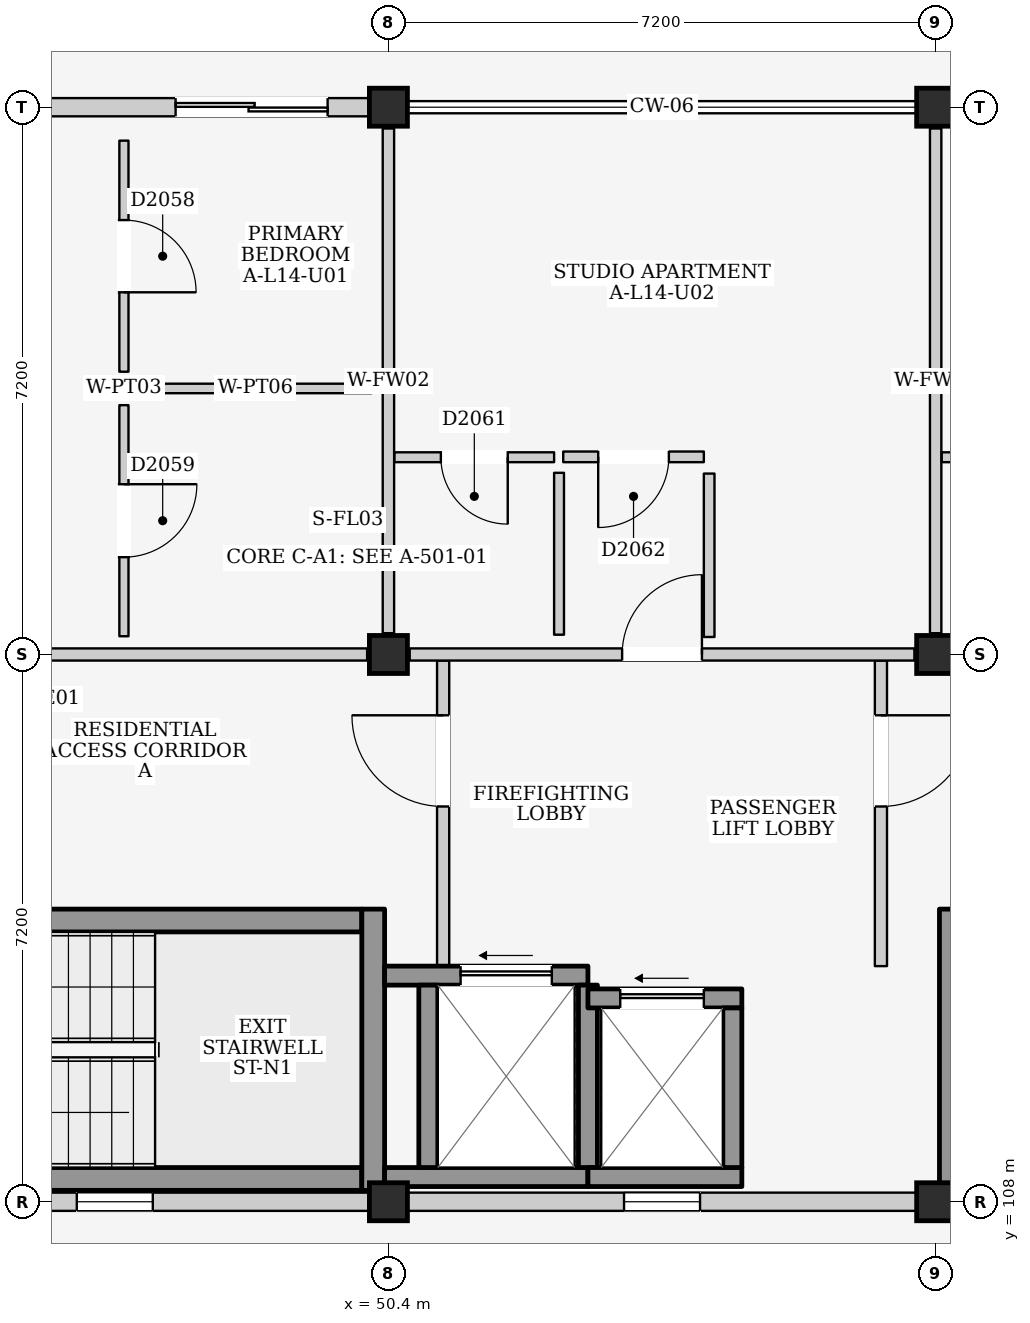
"""IFC4 building model, lengths in metres.
Left out: names, types, materials, properties, quantities, classifications, styles, units other than length and angle.
Written with IfcOpenShell. Run it as: python <this file> out.ifc"""

import sys

from ifc_helpers import new_model, si_unit, direction, frame, frame_2d, origin, origin_2d, place, context, subcontext, project, spatial, rectangle, extrude, element, fill, save


model = new_model("IFC4")
c1 = context("Model", 3, precision=1e-05, world=origin(), true_north=direction((0.0, 1.0)))
c2 = subcontext(c1, "Body", "Model", "MODEL_VIEW")
j1 = project(units=[si_unit("LENGTHUNIT", "METRE"), si_unit("PLANEANGLEUNIT", "RADIAN")], contexts=[c1])
p1 = place(None, origin())
s1 = spatial("IfcSite", under=j1, at=p1, CompositionType="ELEMENT")
p2 = place(p1, origin())
s2 = spatial("IfcBuilding", under=s1, at=p2, CompositionType="ELEMENT")
p3 = place(p2, frame((0.0, 0.0, 47.7)))
s3 = spatial("IfcBuildingStorey", under=s2, at=p3, CompositionType="ELEMENT", Elevation=47.7)
for number, where, z_axis, x_axis in (
    (1, (50.4, 108.0, 0.0), (0.0, 0.0, 1.0), (1.0, 0.0, 0.0)),
    (2, (50.4, 115.2, 0.0), (0.0, 0.0, 1.0), (1.0, 0.0, 0.0)),
    (3, (50.4, 122.4, 0.0), (0.0, 0.0, 1.0), (1.0, 0.0, 0.0)),
    (4, (57.6, 108.0, 0.0), (0.0, 0.0, 1.0), (1.0, 0.0, 0.0)),
    (5, (57.6, 115.2, 0.0), (0.0, 0.0, 1.0), (1.0, 0.0, 0.0)),
    (6, (57.6, 122.4, 0.0), (0.0, 0.0, 1.0), (1.0, 0.0, 0.0)),
):
    element("IfcColumn", number, at=place(p3, frame(where, z_axis=z_axis, x_axis=x_axis)), inside=s3, PredefinedType="COLUMN", context=c2, shape_type="SweptSolid", body=[
        extrude(rectangle(XDim=0.5, YDim=0.5, at=origin_2d()), origin(), (0.0, 0.0, 1.0), 3.2),
    ])
p4 = place(p3, frame((43.45, 122.4, 0.0), z_axis=(0.0, 0.0, 1.0), x_axis=(1.0, 0.0, 0.0)))
e7 = element("IfcWall", 7, at=p4, inside=s3, PredefinedType="ELEMENTEDWALL", context=c2, shape_type="SweptSolid", body=[
    extrude(rectangle(XDim=6.7, YDim=0.24, at=frame_2d((3.35, 0.0))), origin(), (0.0, 0.0, 1.0), 2.535),
])
p5 = place(p4, frame((4.15, 0.0, 0.0)))
e8 = element("IfcOpeningElement", 8, at=p5, cuts=e7, PredefinedType="OPENING", context=c2, shape_type="SweptSolid", body=[
    extrude(rectangle(XDim=2.0, YDim=2.12, at=frame_2d((1.0, 1.06))), frame((0.0, 0.135, 0.0), z_axis=(0.0, -1.0, 0.0), x_axis=(1.0, 0.0, 0.0)), (0.0, 0.0, 1.0), 0.27),
])
p6 = place(p4, frame((0.45, 0.0, 0.9)))
e9 = element("IfcOpeningElement", 9, at=p6, cuts=e7, PredefinedType="OPENING", context=c2, shape_type="SweptSolid", body=[
    extrude(rectangle(XDim=1.85, YDim=1.4, at=frame_2d((0.925, 0.7))), frame((0.0, 0.135, 0.0), z_axis=(0.0, -1.0, 0.0), x_axis=(1.0, 0.0, 0.0)), (0.0, 0.0, 1.0), 0.27),
])
p7 = place(p3, frame((43.45, 108.0, 0.0), z_axis=(0.0, 0.0, 1.0), x_axis=(1.0, 0.0, 0.0)))
e10 = element("IfcWall", 10, at=p7, inside=s3, PredefinedType="ELEMENTEDWALL", context=c2, shape_type="SweptSolid", body=[
    extrude(rectangle(XDim=6.7, YDim=0.24, at=frame_2d((3.35, 0.0))), origin(), (0.0, 0.0, 1.0), 2.335),
])
p8 = place(p7, frame((2.85, 0.0, 1.2)))
e11 = element("IfcOpeningElement", 11, at=p8, cuts=e10, PredefinedType="OPENING", context=c2, shape_type="SweptSolid", body=[
    extrude(rectangle(XDim=1.0, YDim=0.9, at=frame_2d((0.5, 0.45))), frame((0.0, 0.135, 0.0), z_axis=(0.0, -1.0, 0.0), x_axis=(1.0, 0.0, 0.0)), (0.0, 0.0, 1.0), 0.27),
])
p9 = place(p3, frame((50.65, 108.0, 0.0), z_axis=(0.0, 0.0, 1.0), x_axis=(1.0, 0.0, 0.0)))
e12 = element("IfcWall", 12, at=p9, inside=s3, PredefinedType="ELEMENTEDWALL", context=c2, shape_type="SweptSolid", body=[
    extrude(rectangle(XDim=6.7, YDim=0.24, at=frame_2d((3.35, 0.0))), origin(), (0.0, 0.0, 1.0), 2.335),
])
p10 = place(p9, frame((2.85, 0.0, 1.2)))
e13 = element("IfcOpeningElement", 13, at=p10, cuts=e12, PredefinedType="OPENING", context=c2, shape_type="SweptSolid", body=[
    extrude(rectangle(XDim=1.0, YDim=0.9, at=frame_2d((0.5, 0.45))), frame((0.0, 0.135, 0.0), z_axis=(0.0, -1.0, 0.0), x_axis=(1.0, 0.0, 0.0)), (0.0, 0.0, 1.0), 0.27),
])
p11 = place(p3, frame((43.55, 108.3, 0.0), z_axis=(0.0, 0.0, 1.0), x_axis=(1.0, 0.0, 0.0)))
e14 = element("IfcWall", 14, at=p11, inside=s3, PredefinedType="SHEAR", context=c2, shape_type="SweptSolid", body=[
    extrude(rectangle(XDim=6.5, YDim=0.3, at=frame_2d((3.25, 0.0))), origin(), (0.0, 0.0, 1.0), 3.0),
])
p12 = place(p3, frame((43.55, 111.7, 0.0), z_axis=(0.0, 0.0, 1.0), x_axis=(1.0, 0.0, 0.0)))
e15 = element("IfcWall", 15, at=p12, inside=s3, PredefinedType="SHEAR", context=c2, shape_type="SweptSolid", body=[
    extrude(rectangle(XDim=6.5, YDim=0.3, at=frame_2d((3.25, 0.0))), origin(), (0.0, 0.0, 1.0), 3.0),
])
p13 = place(p12, frame((0.18, 0.0, 0.0)))
e16 = element("IfcOpeningElement", 16, at=p13, cuts=e15, PredefinedType="OPENING", context=c2, shape_type="SweptSolid", body=[
    extrude(rectangle(XDim=1.15, YDim=2.2, at=frame_2d((0.575, 1.1))), frame((0.0, 0.165, 0.0), z_axis=(0.0, -1.0, 0.0), x_axis=(1.0, 0.0, 0.0)), (0.0, 0.0, 1.0), 0.33),
])
p14 = place(p3, frame((50.2, 108.15, 0.0), z_axis=(0.0, 0.0, 1.0), x_axis=(0.0, 1.0, 0.0)))
e17 = element("IfcWall", 17, at=p14, inside=s3, PredefinedType="SHEAR", context=c2, shape_type="SweptSolid", body=[
    extrude(rectangle(XDim=3.7, YDim=0.3, at=frame_2d((1.85, 0.0))), origin(), (0.0, 0.0, 1.0), 3.0),
])
p15 = place(p3, frame((51.12, 111.1, 0.0), z_axis=(0.0, 0.0, 1.0), x_axis=(0.0, 1.0, 0.0)))
e18 = element("IfcWall", 18, at=p15, inside=s3, PredefinedType="PARTITIONING", context=c2, shape_type="SweptSolid", body=[
    extrude(rectangle(XDim=4.02, YDim=0.16, at=frame_2d((2.01, 0.0))), origin(), (0.0, 0.0, 1.0), 3.0),
])
p16 = place(p15, frame((2.1, 0.0, 0.0)))
e19 = element("IfcOpeningElement", 19, at=p16, cuts=e18, PredefinedType="OPENING", context=c2, shape_type="SweptSolid", body=[
    extrude(rectangle(XDim=1.2, YDim=2.2, at=frame_2d((0.6, 1.1))), frame((0.0, 0.095, 0.0), z_axis=(0.0, -1.0, 0.0), x_axis=(1.0, 0.0, 0.0)), (0.0, 0.0, 1.0), 0.19),
])
p17 = place(p3, frame((56.88, 111.1, 0.0), z_axis=(0.0, 0.0, 1.0), x_axis=(0.0, 1.0, 0.0)))
e20 = element("IfcWall", 20, at=p17, inside=s3, PredefinedType="PARTITIONING", context=c2, shape_type="SweptSolid", body=[
    extrude(rectangle(XDim=4.02, YDim=0.16, at=frame_2d((2.01, 0.0))), origin(), (0.0, 0.0, 1.0), 3.0),
])
p18 = place(p17, frame((2.1, 0.0, 0.0)))
e21 = element("IfcOpeningElement", 21, at=p18, cuts=e20, PredefinedType="OPENING", context=c2, shape_type="SweptSolid", body=[
    extrude(rectangle(XDim=1.2, YDim=2.2, at=frame_2d((0.6, 1.1))), frame((0.0, 0.095, 0.0), z_axis=(0.0, -1.0, 0.0), x_axis=(1.0, 0.0, 0.0)), (0.0, 0.0, 1.0), 0.19),
])
p19 = place(p3, frame((50.35, 108.325, 0.0), z_axis=(0.0, 0.0, 1.0), x_axis=(1.0, 0.0, 0.0)))
e22 = element("IfcWall", 22, at=p19, inside=s3, PredefinedType="SHEAR", context=c2, shape_type="SweptSolid", body=[
    extrude(rectangle(XDim=2.675, YDim=0.25, at=frame_2d((1.337, 0.0))), origin(), (0.0, 0.0, 1.0), 3.0),
])
p20 = place(p3, frame((50.35, 110.975, 0.0), z_axis=(0.0, 0.0, 1.0), x_axis=(1.0, 0.0, 0.0)))
e23 = element("IfcWall", 23, at=p20, inside=s3, PredefinedType="SHEAR", context=c2, shape_type="SweptSolid", body=[
    extrude(rectangle(XDim=2.675, YDim=0.25, at=frame_2d((1.337, 0.0))), origin(), (0.0, 0.0, 1.0), 3.0),
])
p21 = place(p20, frame((1.0, 0.0, 0.0)))
e24 = element("IfcOpeningElement", 24, at=p21, cuts=e23, PredefinedType="OPENING", context=c2, shape_type="SweptSolid", body=[
    extrude(rectangle(XDim=1.2, YDim=2.25, at=frame_2d((0.6, 1.125))), frame((0.0, 0.14, 0.0), z_axis=(0.0, -1.0, 0.0), x_axis=(1.0, 0.0, 0.0)), (0.0, 0.0, 1.0), 0.28),
])
for number, where, z_axis, x_axis in (
    (25, (50.925, 108.45, 0.0), (0.0, 0.0, 1.0), (0.0, 1.0, 0.0)),
    (26, (53.025, 108.45, 0.0), (0.0, 0.0, 1.0), (0.0, 1.0, 0.0)),
):
    element("IfcWall", number, at=place(p3, frame(where, z_axis=z_axis, x_axis=x_axis)), inside=s3, PredefinedType="SHEAR", context=c2, shape_type="SweptSolid", body=[
        extrude(rectangle(XDim=2.4, YDim=0.25, at=frame_2d((1.2, 0.0))), origin(), (0.0, 0.0, 1.0), 3.0),
    ])
p22 = place(p3, frame((53.025, 108.325, 0.0), z_axis=(0.0, 0.0, 1.0), x_axis=(1.0, 0.0, 0.0)))
e27 = element("IfcWall", 27, at=p22, inside=s3, PredefinedType="SHEAR", context=c2, shape_type="SweptSolid", body=[
    extrude(rectangle(XDim=2.025, YDim=0.25, at=frame_2d((1.013, 0.0))), origin(), (0.0, 0.0, 1.0), 3.0),
])
p23 = place(p3, frame((53.025, 110.675, 0.0), z_axis=(0.0, 0.0, 1.0), x_axis=(1.0, 0.0, 0.0)))
e28 = element("IfcWall", 28, at=p23, inside=s3, PredefinedType="SHEAR", context=c2, shape_type="SweptSolid", body=[
    extrude(rectangle(XDim=2.025, YDim=0.25, at=frame_2d((1.013, 0.0))), origin(), (0.0, 0.0, 1.0), 3.0),
])
p24 = place(p23, frame((0.425, 0.0, 0.0)))
e29 = element("IfcOpeningElement", 29, at=p24, cuts=e28, PredefinedType="OPENING", context=c2, shape_type="SweptSolid", body=[
    extrude(rectangle(XDim=1.1, YDim=2.15, at=frame_2d((0.55, 1.075))), frame((0.0, 0.14, 0.0), z_axis=(0.0, -1.0, 0.0), x_axis=(1.0, 0.0, 0.0)), (0.0, 0.0, 1.0), 0.28),
])
p25 = place(p3, frame((54.925, 108.45, 0.0), z_axis=(0.0, 0.0, 1.0), x_axis=(0.0, 1.0, 0.0)))
e30 = element("IfcWall", 30, at=p25, inside=s3, PredefinedType="SHEAR", context=c2, shape_type="SweptSolid", body=[
    extrude(rectangle(XDim=2.1, YDim=0.25, at=frame_2d((1.05, 0.0))), origin(), (0.0, 0.0, 1.0), 3.0),
])
p26 = place(p3, frame((57.8, 108.15, 0.0), z_axis=(0.0, 0.0, 1.0), x_axis=(0.0, 1.0, 0.0)))
e31 = element("IfcWall", 31, at=p26, inside=s3, PredefinedType="SHEAR", context=c2, shape_type="SweptSolid", body=[
    extrude(rectangle(XDim=3.7, YDim=0.3, at=frame_2d((1.85, 0.0))), origin(), (0.0, 0.0, 1.0), 3.0),
])
p27 = place(p3, frame((43.48, 115.2, 0.0), z_axis=(0.0, 0.0, 1.0), x_axis=(1.0, 0.0, 0.0)))
e32 = element("IfcWall", 32, at=p27, inside=s3, PredefinedType="PARTITIONING", context=c2, shape_type="SweptSolid", body=[
    extrude(rectangle(XDim=6.64, YDim=0.16, at=frame_2d((3.32, 0.0))), origin(), (0.0, 0.0, 1.0), 2.335),
])
p28 = place(p27, frame((0.18, 0.0, 0.0)))
e33 = element("IfcOpeningElement", 33, at=p28, cuts=e32, PredefinedType="OPENING", context=c2, shape_type="SweptSolid", body=[
    extrude(rectangle(XDim=1.05, YDim=2.15, at=frame_2d((0.525, 1.075))), frame((0.0, 0.095, 0.0), z_axis=(0.0, -1.0, 0.0), x_axis=(1.0, 0.0, 0.0)), (0.0, 0.0, 1.0), 0.19),
])
p29 = place(p3, frame((50.4, 115.48, 0.0), z_axis=(0.0, 0.0, 1.0), x_axis=(0.0, 1.0, 0.0)))
e34 = element("IfcWall", 34, at=p29, inside=s3, PredefinedType="PARTITIONING", context=c2, shape_type="SweptSolid", body=[
    extrude(rectangle(XDim=6.64, YDim=0.15, at=frame_2d((3.32, 0.0))), origin(), (0.0, 0.0, 1.0), 2.485),
])
p30 = place(p3, frame((46.92, 118.92, 0.0), z_axis=(0.0, 0.0, 1.0), x_axis=(0.0, 1.0, 0.0)))
e35 = element("IfcWall", 35, at=p30, inside=s3, PredefinedType="PARTITIONING", context=c2, shape_type="SweptSolid", body=[
    extrude(rectangle(XDim=3.04, YDim=0.12, at=frame_2d((1.52, 0.0))), origin(), (0.0, 0.0, 1.0), 3.0),
])
p31 = place(p30, frame((1.045, 0.0, 0.0)))
e36 = element("IfcOpeningElement", 36, at=p31, cuts=e35, PredefinedType="OPENING", context=c2, shape_type="SweptSolid", body=[
    extrude(rectangle(XDim=0.95, YDim=2.15, at=frame_2d((0.475, 1.075))), frame((0.0, 0.075, 0.0), z_axis=(0.0, -1.0, 0.0), x_axis=(1.0, 0.0, 0.0)), (0.0, 0.0, 1.0), 0.15),
])
p32 = place(p3, frame((47.12, 118.7, 0.0), z_axis=(0.0, 0.0, 1.0), x_axis=(1.0, 0.0, 0.0)))
e37 = element("IfcWall", 37, at=p32, inside=s3, PredefinedType="PARTITIONING", context=c2, shape_type="SweptSolid", body=[
    extrude(rectangle(XDim=3.06, YDim=0.125, at=frame_2d((1.53, 0.0))), origin(), (0.0, 0.0, 1.0), 3.0),
])
p33 = place(p3, frame((46.92, 115.44, 0.0), z_axis=(0.0, 0.0, 1.0), x_axis=(0.0, 1.0, 0.0)))
e38 = element("IfcWall", 38, at=p33, inside=s3, PredefinedType="PARTITIONING", context=c2, shape_type="SweptSolid", body=[
    extrude(rectangle(XDim=3.04, YDim=0.12, at=frame_2d((1.52, 0.0))), origin(), (0.0, 0.0, 1.0), 3.0),
])
p34 = place(p33, frame((1.04, 0.0, 0.0)))
e39 = element("IfcOpeningElement", 39, at=p34, cuts=e38, PredefinedType="OPENING", context=c2, shape_type="SweptSolid", body=[
    extrude(rectangle(XDim=0.96, YDim=2.15, at=frame_2d((0.48, 1.075))), frame((0.0, 0.075, 0.0), z_axis=(0.0, -1.0, 0.0), x_axis=(1.0, 0.0, 0.0)), (0.0, 0.0, 1.0), 0.15),
])
p35 = place(p3, frame((50.68, 115.2, 0.0), z_axis=(0.0, 0.0, 1.0), x_axis=(1.0, 0.0, 0.0)))
e40 = element("IfcWall", 40, at=p35, inside=s3, PredefinedType="PARTITIONING", context=c2, shape_type="SweptSolid", body=[
    extrude(rectangle(XDim=6.64, YDim=0.16, at=frame_2d((3.32, 0.0))), origin(), (0.0, 0.0, 1.0), 2.335),
])
p36 = place(p35, frame((2.795, 0.0, 0.0)))
e41 = element("IfcOpeningElement", 41, at=p36, cuts=e40, PredefinedType="OPENING", context=c2, shape_type="SweptSolid", body=[
    extrude(rectangle(XDim=1.05, YDim=2.15, at=frame_2d((0.525, 1.075))), frame((0.0, 0.095, 0.0), z_axis=(0.0, -1.0, 0.0), x_axis=(1.0, 0.0, 0.0)), (0.0, 0.0, 1.0), 0.19),
])
p37 = place(p3, frame((57.6, 115.48, 0.0), z_axis=(0.0, 0.0, 1.0), x_axis=(0.0, 1.0, 0.0)))
e42 = element("IfcWall", 42, at=p37, inside=s3, PredefinedType="PARTITIONING", context=c2, shape_type="SweptSolid", body=[
    extrude(rectangle(XDim=6.64, YDim=0.15, at=frame_2d((3.32, 0.0))), origin(), (0.0, 0.0, 1.0), 2.485),
])
p38 = place(p3, frame((50.48, 117.795, 0.0), z_axis=(0.0, 0.0, 1.0), x_axis=(1.0, 0.0, 0.0)))
e43 = element("IfcWall", 43, at=p38, inside=s3, PredefinedType="PARTITIONING", context=c2, shape_type="SweptSolid", body=[
    extrude(rectangle(XDim=2.1, YDim=0.13, at=frame_2d((1.05, 0.0))), origin(), (0.0, 0.0, 1.0), 3.0),
])
p39 = place(p38, frame((0.61, 0.0, 0.0)))
e44 = element("IfcOpeningElement", 44, at=p39, cuts=e43, PredefinedType="OPENING", context=c2, shape_type="SweptSolid", body=[
    extrude(rectangle(XDim=0.88, YDim=2.1, at=frame_2d((0.44, 1.05))), frame((0.0, 0.08, 0.0), z_axis=(0.0, -1.0, 0.0), x_axis=(1.0, 0.0, 0.0)), (0.0, 0.0, 1.0), 0.16),
])
p40 = place(p3, frame((52.645, 115.46, 0.0), z_axis=(0.0, 0.0, 1.0), x_axis=(0.0, 1.0, 0.0)))
e45 = element("IfcWall", 45, at=p40, inside=s3, PredefinedType="PARTITIONING", context=c2, shape_type="SweptSolid", body=[
    extrude(rectangle(XDim=2.13, YDim=0.13, at=frame_2d((1.065, 0.0))), origin(), (0.0, 0.0, 1.0), 3.0),
])
p41 = place(p3, frame((52.7, 117.8, 0.0), z_axis=(0.0, 0.0, 1.0), x_axis=(1.0, 0.0, 0.0)))
e46 = element("IfcWall", 46, at=p41, inside=s3, PredefinedType="PARTITIONING", context=c2, shape_type="SweptSolid", body=[
    extrude(rectangle(XDim=1.85, YDim=0.14, at=frame_2d((0.925, 0.0))), origin(), (0.0, 0.0, 1.0), 3.0),
])
p42 = place(p41, frame((0.46, 0.0, 0.0)))
e47 = element("IfcOpeningElement", 47, at=p42, cuts=e46, PredefinedType="OPENING", context=c2, shape_type="SweptSolid", body=[
    extrude(rectangle(XDim=0.93, YDim=2.14, at=frame_2d((0.465, 1.07))), frame((0.0, 0.085, 0.0), z_axis=(0.0, -1.0, 0.0), x_axis=(1.0, 0.0, 0.0)), (0.0, 0.0, 1.0), 0.17),
])
p43 = place(p3, frame((54.62, 115.43, 0.0), z_axis=(0.0, 0.0, 1.0), x_axis=(0.0, 1.0, 0.0)))
e48 = element("IfcWall", 48, at=p43, inside=s3, PredefinedType="PARTITIONING", context=c2, shape_type="SweptSolid", body=[
    extrude(rectangle(XDim=2.15, YDim=0.14, at=frame_2d((1.075, 0.0))), origin(), (0.0, 0.0, 1.0), 3.0),
])
p44 = place(p3, frame((57.68, 117.795, 0.0), z_axis=(0.0, 0.0, 1.0), x_axis=(1.0, 0.0, 0.0)))
e49 = element("IfcWall", 49, at=p44, inside=s3, PredefinedType="PARTITIONING", context=c2, shape_type="SweptSolid", body=[
    extrude(rectangle(XDim=2.1, YDim=0.13, at=frame_2d((1.05, 0.0))), origin(), (0.0, 0.0, 1.0), 3.0),
])
p45 = place(p44, frame((0.61, 0.0, 0.0)))
e50 = element("IfcOpeningElement", 50, at=p45, cuts=e49, PredefinedType="OPENING", context=c2, shape_type="SweptSolid", body=[
    extrude(rectangle(XDim=0.88, YDim=2.1, at=frame_2d((0.44, 1.05))), frame((0.0, 0.08, 0.0), z_axis=(0.0, -1.0, 0.0), x_axis=(1.0, 0.0, 0.0)), (0.0, 0.0, 1.0), 0.16),
])
p46 = place(p5, frame((2.0, 0.0, 0.0), z_axis=(0.0, 0.0, 1.0), x_axis=(-1.0, 0.0, 0.0)))
e51 = element("IfcDoor", 51, at=p46, inside=s3, OperationType="DOUBLE_DOOR_SLIDING", PredefinedType="DOOR", context=c2, shape_type="SweptSolid", body=[
    extrude(rectangle(XDim=2.0, YDim=2.12, at=frame_2d((1.0, 1.06))), frame((0.0, 0.025, 0.0), z_axis=(0.0, -1.0, 0.0), x_axis=(1.0, 0.0, 0.0)), (0.0, 0.0, 1.0), 0.05),
])
fill(e8, e51)
p47 = place(p8, origin())
e52 = element("IfcWindow", 52, at=p47, inside=s3, PartitioningType="SINGLE_PANEL", PredefinedType="WINDOW", context=c2, shape_type="SweptSolid", body=[
    extrude(rectangle(XDim=1.0, YDim=0.9, at=frame_2d((0.5, 0.45))), frame((0.0, 0.03, 0.0), z_axis=(0.0, -1.0, 0.0), x_axis=(1.0, 0.0, 0.0)), (0.0, 0.0, 1.0), 0.06),
])
fill(e11, e52)
p48 = place(p10, origin())
e53 = element("IfcWindow", 53, at=p48, inside=s3, PartitioningType="SINGLE_PANEL", PredefinedType="WINDOW", context=c2, shape_type="SweptSolid", body=[
    extrude(rectangle(XDim=1.0, YDim=0.9, at=frame_2d((0.5, 0.45))), frame((0.0, 0.03, 0.0), z_axis=(0.0, -1.0, 0.0), x_axis=(1.0, 0.0, 0.0)), (0.0, 0.0, 1.0), 0.06),
])
fill(e13, e53)
p49 = place(p16, origin())
e54 = element("IfcDoor", 54, at=p49, inside=s3, OperationType="SINGLE_SWING_RIGHT", PredefinedType="DOOR", context=c2, shape_type="SweptSolid", body=[
    extrude(rectangle(XDim=1.2, YDim=2.2, at=frame_2d((0.6, 1.1))), frame((0.0, 0.025, 0.0), z_axis=(0.0, -1.0, 0.0), x_axis=(1.0, 0.0, 0.0)), (0.0, 0.0, 1.0), 0.05),
])
fill(e19, e54)
p50 = place(p18, frame((1.2, 0.0, 0.0), z_axis=(0.0, 0.0, 1.0), x_axis=(-1.0, 0.0, 0.0)))
e55 = element("IfcDoor", 55, at=p50, inside=s3, OperationType="SINGLE_SWING_LEFT", PredefinedType="DOOR", context=c2, shape_type="SweptSolid", body=[
    extrude(rectangle(XDim=1.2, YDim=2.2, at=frame_2d((0.6, 1.1))), frame((0.0, 0.025, 0.0), z_axis=(0.0, -1.0, 0.0), x_axis=(1.0, 0.0, 0.0)), (0.0, 0.0, 1.0), 0.05),
])
fill(e21, e55)
p51 = place(p21, origin())
e56 = element("IfcDoor", 56, at=p51, inside=s3, OperationType="SLIDING_TO_LEFT", PredefinedType="DOOR", context=c2, shape_type="SweptSolid", body=[
    extrude(rectangle(XDim=1.2, YDim=2.25, at=frame_2d((0.6, 1.125))), frame((0.0, 0.025, 0.0), z_axis=(0.0, -1.0, 0.0), x_axis=(1.0, 0.0, 0.0)), (0.0, 0.0, 1.0), 0.05),
])
fill(e24, e56)
p52 = place(p24, origin())
e57 = element("IfcDoor", 57, at=p52, inside=s3, OperationType="SLIDING_TO_LEFT", PredefinedType="DOOR", context=c2, shape_type="SweptSolid", body=[
    extrude(rectangle(XDim=1.1, YDim=2.15, at=frame_2d((0.55, 1.075))), frame((0.0, 0.025, 0.0), z_axis=(0.0, -1.0, 0.0), x_axis=(1.0, 0.0, 0.0)), (0.0, 0.0, 1.0), 0.05),
])
fill(e29, e57)
p53 = place(p31, frame((0.95, 0.0, 0.0), z_axis=(0.0, 0.0, 1.0), x_axis=(-1.0, 0.0, 0.0)))
e58 = element("IfcDoor", 58, at=p53, inside=s3, OperationType="SINGLE_SWING_RIGHT", PredefinedType="DOOR", context=c2, shape_type="SweptSolid", body=[
    extrude(rectangle(XDim=0.95, YDim=2.15, at=frame_2d((0.475, 1.075))), frame((0.0, 0.025, 0.0), z_axis=(0.0, -1.0, 0.0), x_axis=(1.0, 0.0, 0.0)), (0.0, 0.0, 1.0), 0.05),
])
fill(e36, e58)
p54 = place(p34, frame((0.96, 0.0, 0.0), z_axis=(0.0, 0.0, 1.0), x_axis=(-1.0, 0.0, 0.0)))
e59 = element("IfcDoor", 59, at=p54, inside=s3, OperationType="SINGLE_SWING_LEFT", PredefinedType="DOOR", context=c2, shape_type="SweptSolid", body=[
    extrude(rectangle(XDim=0.96, YDim=2.15, at=frame_2d((0.48, 1.075))), frame((0.0, 0.025, 0.0), z_axis=(0.0, -1.0, 0.0), x_axis=(1.0, 0.0, 0.0)), (0.0, 0.0, 1.0), 0.05),
])
fill(e39, e59)
p55 = place(p36, origin())
e60 = element("IfcDoor", 60, at=p55, inside=s3, OperationType="SINGLE_SWING_RIGHT", PredefinedType="DOOR", context=c2, shape_type="SweptSolid", body=[
    extrude(rectangle(XDim=1.05, YDim=2.15, at=frame_2d((0.525, 1.075))), frame((0.0, 0.025, 0.0), z_axis=(0.0, -1.0, 0.0), x_axis=(1.0, 0.0, 0.0)), (0.0, 0.0, 1.0), 0.05),
])
fill(e41, e60)
p56 = place(p39, frame((0.88, 0.0, 0.0), z_axis=(0.0, 0.0, 1.0), x_axis=(-1.0, 0.0, 0.0)))
e61 = element("IfcDoor", 61, at=p56, inside=s3, OperationType="SINGLE_SWING_LEFT", PredefinedType="DOOR", context=c2, shape_type="SweptSolid", body=[
    extrude(rectangle(XDim=0.88, YDim=2.1, at=frame_2d((0.44, 1.05))), frame((0.0, 0.025, 0.0), z_axis=(0.0, -1.0, 0.0), x_axis=(1.0, 0.0, 0.0)), (0.0, 0.0, 1.0), 0.05),
])
fill(e44, e61)
p57 = place(p42, frame((0.93, 0.0, 0.0), z_axis=(0.0, 0.0, 1.0), x_axis=(-1.0, 0.0, 0.0)))
e62 = element("IfcDoor", 62, at=p57, inside=s3, OperationType="SINGLE_SWING_RIGHT", PredefinedType="DOOR", context=c2, shape_type="SweptSolid", body=[
    extrude(rectangle(XDim=0.93, YDim=2.14, at=frame_2d((0.465, 1.07))), frame((0.0, 0.025, 0.0), z_axis=(0.0, -1.0, 0.0), x_axis=(1.0, 0.0, 0.0)), (0.0, 0.0, 1.0), 0.05),
])
fill(e47, e62)
save(model, sys.argv[1])
